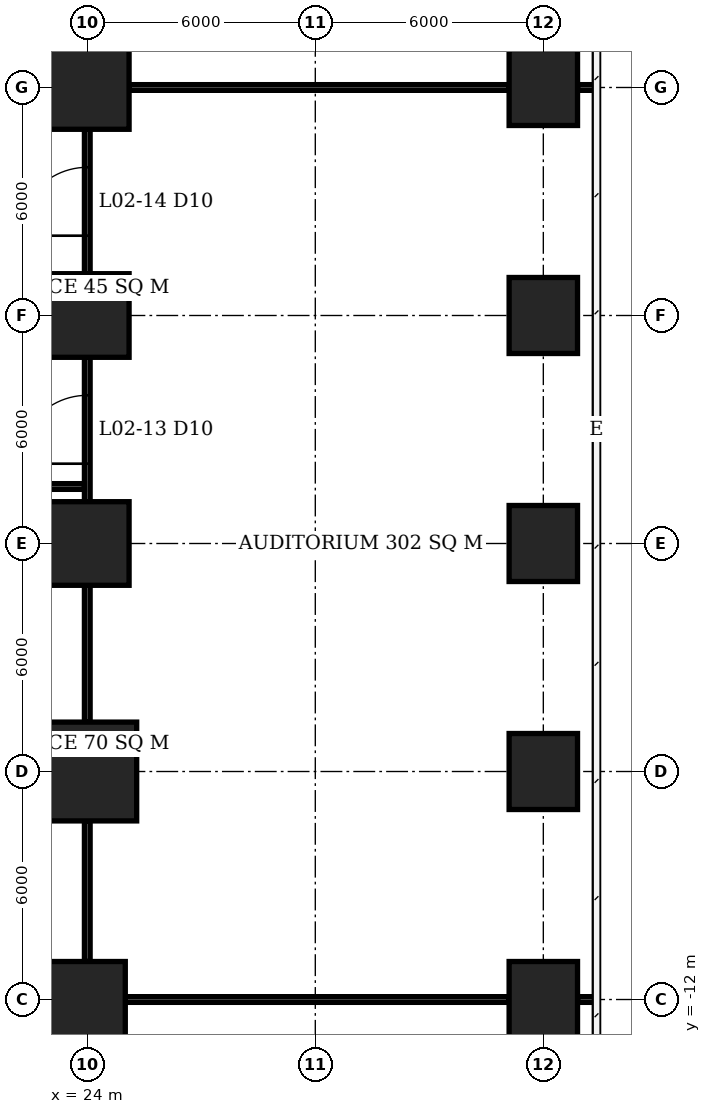
"""IFC4 building model, lengths in metres.
Left out: names, types, materials, properties, quantities, classifications, styles, units other than length and angle.
Written with IfcOpenShell. Run it as: python <this file> out.ifc"""

import sys

from ifc_helpers import new_model, si_unit, direction, frame, frame_2d, origin, origin_2d, place, context, subcontext, project, spatial, rectangle, extrude, element, fill, save


model = new_model("IFC4")
c1 = context("Model", 3, precision=1e-05, world=origin(), true_north=direction((0.0, 1.0)))
c2 = subcontext(c1, "Body", "Model", "MODEL_VIEW")
j1 = project(units=[si_unit("LENGTHUNIT", "METRE"), si_unit("PLANEANGLEUNIT", "RADIAN")], contexts=[c1])
p1 = place(None, origin())
s1 = spatial("IfcSite", under=j1, at=p1, CompositionType="ELEMENT")
p2 = place(p1, origin())
s2 = spatial("IfcBuilding", under=s1, at=p2, CompositionType="ELEMENT")
p3 = place(p2, frame((0.0, 0.0, 11.0)))
s3 = spatial("IfcBuildingStorey", under=s2, at=p3, CompositionType="ELEMENT", Elevation=11.0)
p4 = place(p3, frame((24.0, -12.0, 0.0), z_axis=(0.0, 0.0, 1.0), x_axis=(1.0, 0.0, 0.0)))
e1 = element("IfcColumn", 1, at=p4, inside=s3, PredefinedType="COLUMN", context=c2, shape_type="SweptSolid", body=[
    extrude(rectangle(XDim=2.0, YDim=2.0, at=origin_2d()), origin(), (0.0, 0.0, 1.0), 7.2),
])
p5 = place(p3, frame((24.0, -6.0, 0.0), z_axis=(0.0, 0.0, 1.0), x_axis=(1.0, 0.0, 0.0)))
e2 = element("IfcColumn", 2, at=p5, inside=s3, PredefinedType="COLUMN", context=c2, shape_type="SweptSolid", body=[
    extrude(rectangle(XDim=2.6, YDim=2.6, at=origin_2d()), origin(), (0.0, 0.0, 1.0), 7.2),
])
for number, where, z_axis, x_axis in (
    (3, (24.0, 0.0, 0.0), (0.0, 0.0, 1.0), (1.0, 0.0, 0.0)),
    (4, (24.0, 6.0, 0.0), (0.0, 0.0, 1.0), (1.0, 0.0, 0.0)),
    (5, (24.0, 12.0, 0.0), (0.0, 0.0, 1.0), (1.0, 0.0, 0.0)),
):
    element("IfcColumn", number, at=place(p3, frame(where, z_axis=z_axis, x_axis=x_axis)), inside=s3, PredefinedType="COLUMN", context=c2, shape_type="SweptSolid", body=[
        extrude(rectangle(XDim=2.2, YDim=2.2, at=origin_2d()), origin(), (0.0, 0.0, 1.0), 7.2),
    ])
for number, where, z_axis, x_axis in (
    (6, (36.0, -12.0, 0.0), (0.0, 0.0, 1.0), (0.0, 1.0, 0.0)),
    (7, (36.0, -6.0, 0.0), (0.0, 0.0, 1.0), (0.0, 1.0, 0.0)),
    (8, (36.0, 0.0, 0.0), (0.0, 0.0, 1.0), (0.0, 1.0, 0.0)),
    (9, (36.0, 6.0, 0.0), (0.0, 0.0, 1.0), (0.0, 1.0, 0.0)),
    (10, (36.0, 12.0, 0.0), (0.0, 0.0, 1.0), (0.0, 1.0, 0.0)),
):
    element("IfcColumn", number, at=place(p3, frame(where, z_axis=z_axis, x_axis=x_axis)), inside=s3, PredefinedType="COLUMN", context=c2, shape_type="SweptSolid", body=[
        extrude(rectangle(XDim=2.0, YDim=1.8, at=origin_2d()), origin(), (0.0, 0.0, 1.0), 7.2),
    ])
p6 = place(p3, frame((25.0, -12.0, 0.0), z_axis=(0.0, 0.0, 1.0), x_axis=(1.0, 0.0, 0.0)))
e11 = element("IfcWall", 11, at=p6, inside=s3, PredefinedType="PARTITIONING", context=c2, shape_type="SweptSolid", body=[
    extrude(rectangle(XDim=10.1, YDim=0.15, at=frame_2d((5.05, 0.0))), origin(), (0.0, 0.0, 1.0), 6.8),
])
p7 = place(p3, frame((36.9, -12.0, 0.0), z_axis=(0.0, 0.0, 1.0), x_axis=(1.0, 0.0, 0.0)))
e12 = element("IfcWall", 12, at=p7, inside=s3, PredefinedType="PARTITIONING", context=c2, shape_type="SweptSolid", body=[
    extrude(rectangle(XDim=0.475, YDim=0.15, at=frame_2d((0.238, 0.0))), origin(), (0.0, 0.0, 1.0), 6.8),
])
p8 = place(p3, frame((25.1, 12.0, 0.0), z_axis=(0.0, 0.0, 1.0), x_axis=(1.0, 0.0, 0.0)))
e13 = element("IfcWall", 13, at=p8, inside=s3, PredefinedType="PARTITIONING", context=c2, shape_type="SweptSolid", body=[
    extrude(rectangle(XDim=10.0, YDim=0.15, at=frame_2d((5.0, 0.0))), origin(), (0.0, 0.0, 1.0), 6.8),
])
p9 = place(p3, frame((36.9, 12.0, 0.0), z_axis=(0.0, 0.0, 1.0), x_axis=(1.0, 0.0, 0.0)))
e14 = element("IfcWall", 14, at=p9, inside=s3, PredefinedType="PARTITIONING", context=c2, shape_type="SweptSolid", body=[
    extrude(rectangle(XDim=0.475, YDim=0.15, at=frame_2d((0.238, 0.0))), origin(), (0.0, 0.0, 1.0), 6.8),
])
p10 = place(p3, frame((24.0, -11.0, 0.0), z_axis=(0.0, 0.0, 1.0), x_axis=(0.0, 1.0, 0.0)))
e15 = element("IfcWall", 15, at=p10, inside=s3, PredefinedType="PARTITIONING", context=c2, shape_type="SweptSolid", body=[
    extrude(rectangle(XDim=3.7, YDim=0.15, at=frame_2d((1.85, 0.0))), origin(), (0.0, 0.0, 1.0), 6.8),
])
p11 = place(p3, frame((24.0, -4.7, 0.0), z_axis=(0.0, 0.0, 1.0), x_axis=(0.0, 1.0, 0.0)))
e16 = element("IfcWall", 16, at=p11, inside=s3, PredefinedType="PARTITIONING", context=c2, shape_type="SweptSolid", body=[
    extrude(rectangle(XDim=3.6, YDim=0.15, at=frame_2d((1.8, 0.0))), origin(), (0.0, 0.0, 1.0), 6.8),
])
p12 = place(p3, frame((24.0, 1.1, 0.0), z_axis=(0.0, 0.0, 1.0), x_axis=(0.0, 1.0, 0.0)))
e17 = element("IfcWall", 17, at=p12, inside=s3, PredefinedType="PARTITIONING", context=c2, shape_type="SweptSolid", body=[
    extrude(rectangle(XDim=3.8, YDim=0.15, at=frame_2d((1.9, 0.0))), origin(), (0.0, 0.0, 1.0), 6.8),
])
p13 = place(p12, frame((1.0, 0.0, 0.0)))
e18 = element("IfcOpeningElement", 18, at=p13, cuts=e17, PredefinedType="OPENING", context=c2, shape_type="SweptSolid", body=[
    extrude(rectangle(XDim=1.8, YDim=2.4, at=frame_2d((0.9, 1.2))), frame((0.0, 0.085, 0.0), z_axis=(0.0, -1.0, 0.0), x_axis=(1.0, 0.0, 0.0)), (0.0, 0.0, 1.0), 0.17),
])
p14 = place(p3, frame((24.0, 7.1, 0.0), z_axis=(0.0, 0.0, 1.0), x_axis=(0.0, 1.0, 0.0)))
e19 = element("IfcWall", 19, at=p14, inside=s3, PredefinedType="PARTITIONING", context=c2, shape_type="SweptSolid", body=[
    extrude(rectangle(XDim=3.8, YDim=0.15, at=frame_2d((1.9, 0.0))), origin(), (0.0, 0.0, 1.0), 6.8),
])
p15 = place(p14, frame((1.0, 0.0, 0.0)))
e20 = element("IfcOpeningElement", 20, at=p15, cuts=e19, PredefinedType="OPENING", context=c2, shape_type="SweptSolid", body=[
    extrude(rectangle(XDim=1.8, YDim=2.4, at=frame_2d((0.9, 1.2))), frame((0.0, 0.085, 0.0), z_axis=(0.0, -1.0, 0.0), x_axis=(1.0, 0.0, 0.0)), (0.0, 0.0, 1.0), 0.17),
])
p16 = place(p3, frame((20.35, 1.5, 0.0), z_axis=(0.0, 0.0, 1.0), x_axis=(1.0, 0.0, 0.0)))
e21 = element("IfcWall", 21, at=p16, inside=s3, PredefinedType="PARTITIONING", context=c2, shape_type="SweptSolid", body=[
    extrude(rectangle(XDim=3.575, YDim=0.15, at=frame_2d((1.788, 0.0))), origin(), (0.0, 0.0, 1.0), 6.95),
])
p17 = place(p13, origin())
e22 = element("IfcDoor", 22, at=p17, inside=s3, OperationType="DOUBLE_DOOR_SINGLE_SWING", PredefinedType="DOOR", context=c2, shape_type="SweptSolid", body=[
    extrude(rectangle(XDim=1.8, YDim=2.4, at=frame_2d((0.9, 1.2))), frame((0.0, 0.025, 0.0), z_axis=(0.0, -1.0, 0.0), x_axis=(1.0, 0.0, 0.0)), (0.0, 0.0, 1.0), 0.05),
])
fill(e18, e22)
p18 = place(p15, origin())
e23 = element("IfcDoor", 23, at=p18, inside=s3, OperationType="DOUBLE_DOOR_SINGLE_SWING", PredefinedType="DOOR", context=c2, shape_type="SweptSolid", body=[
    extrude(rectangle(XDim=1.8, YDim=2.4, at=frame_2d((0.9, 1.2))), frame((0.0, 0.025, 0.0), z_axis=(0.0, -1.0, 0.0), x_axis=(1.0, 0.0, 0.0)), (0.0, 0.0, 1.0), 0.05),
])
fill(e20, e23)
save(model, sys.argv[1])
